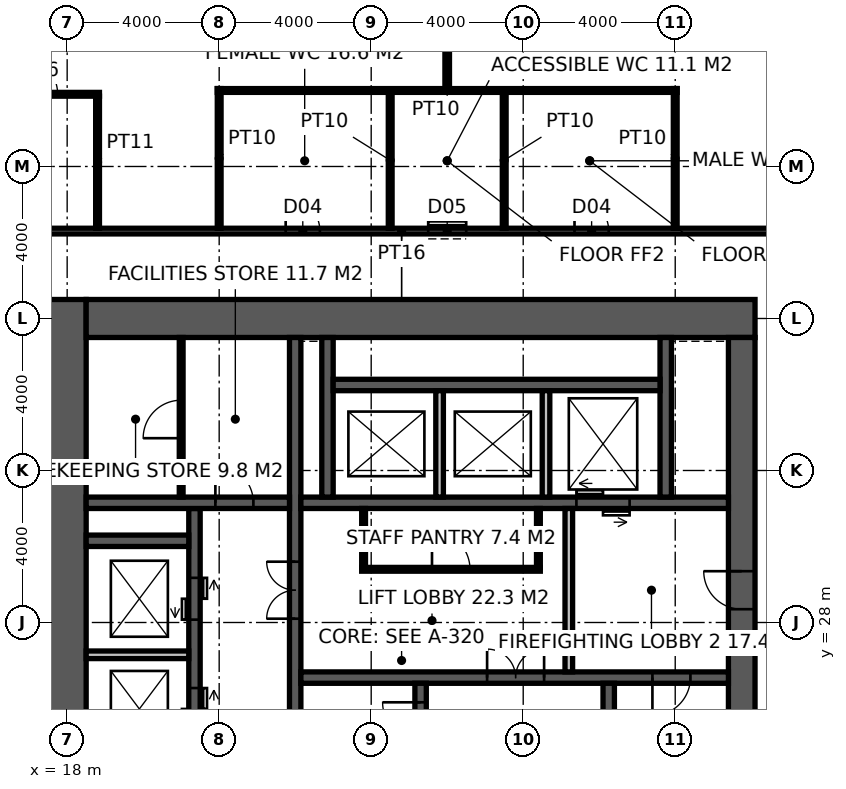
"""IFC4 building model, lengths in metres.
Left out: names, types, materials, properties, quantities, classifications, styles, units other than length and angle.
Written with IfcOpenShell. Run it as: python <this file> out.ifc"""

import sys

from ifc_helpers import new_model, si_unit, direction, frame, frame_2d, origin, place, context, subcontext, project, spatial, rectangle, extrude, element, fill, save


model = new_model("IFC4")
c1 = context("Model", 3, precision=1e-05, world=origin(), true_north=direction((0.0, 1.0)))
c2 = subcontext(c1, "Body", "Model", "MODEL_VIEW")
j1 = project(units=[si_unit("LENGTHUNIT", "METRE"), si_unit("PLANEANGLEUNIT", "RADIAN")], contexts=[c1])
p1 = place(None, origin())
s1 = spatial("IfcSite", under=j1, at=p1, CompositionType="ELEMENT")
p2 = place(p1, origin())
s2 = spatial("IfcBuilding", under=s1, at=p2, CompositionType="ELEMENT")
p3 = place(p2, frame((0.0, 0.0, 81.4)))
s3 = spatial("IfcBuildingStorey", under=s2, at=p3, CompositionType="ELEMENT", Elevation=81.4)
p4 = place(p3, frame((18.0, 17.5, -0.15), z_axis=(0.0, 0.0, 1.0), x_axis=(0.0, 1.0, 0.0)))
e1 = element("IfcWall", 1, at=p4, inside=s3, PredefinedType="SHEAR", context=c2, shape_type="SweptSolid", body=[
    extrude(rectangle(XDim=19.0, YDim=1.0, at=frame_2d((9.5, 0.0))), origin(), (0.0, 0.0, 1.0), 4.0),
])
p5 = place(p3, frame((18.5, 36.0, -0.15), z_axis=(0.0, 0.0, 1.0), x_axis=(1.0, 0.0, 0.0)))
e2 = element("IfcWall", 2, at=p5, inside=s3, PredefinedType="SHEAR", context=c2, shape_type="SweptSolid", body=[
    extrude(rectangle(XDim=17.6, YDim=1.0, at=frame_2d((8.8, 0.0))), origin(), (0.0, 0.0, 1.0), 4.0),
])
p6 = place(p3, frame((35.75, 18.5, -0.15), z_axis=(0.0, 0.0, 1.0), x_axis=(0.0, 1.0, 0.0)))
e3 = element("IfcWall", 3, at=p6, inside=s3, PredefinedType="SHEAR", context=c2, shape_type="SweptSolid", body=[
    extrude(rectangle(XDim=17.0, YDim=0.7, at=frame_2d((8.5, 0.0))), origin(), (0.0, 0.0, 1.0), 4.0),
])
p7 = place(p6, frame((9.85, 0.0, 0.15)))
e4 = element("IfcOpeningElement", 4, at=p7, cuts=e3, PredefinedType="OPENING", context=c2, shape_type="SweptSolid", body=[
    extrude(rectangle(XDim=1.0, YDim=2.2, at=frame_2d((0.5, 1.1))), frame((0.0, 0.36, 0.0), z_axis=(0.0, -1.0, 0.0), x_axis=(1.0, 0.0, 0.0)), (0.0, 0.0, 1.0), 0.72),
])
p8 = place(p3, frame((24.0, 18.5, -0.15), z_axis=(0.0, 0.0, 1.0), x_axis=(0.0, 1.0, 0.0)))
e5 = element("IfcWall", 5, at=p8, inside=s3, PredefinedType="SHEAR", context=c2, shape_type="SweptSolid", body=[
    extrude(rectangle(XDim=17.0, YDim=0.3, at=frame_2d((8.5, 0.0))), origin(), (0.0, 0.0, 1.0), 4.0),
])
p9 = place(p8, frame((9.6, 0.0, 0.15)))
e6 = element("IfcOpeningElement", 6, at=p9, cuts=e5, PredefinedType="OPENING", context=c2, shape_type="SweptSolid", body=[
    extrude(rectangle(XDim=1.5, YDim=2.4, at=frame_2d((0.75, 1.2))), frame((0.0, 0.16, 0.0), z_axis=(0.0, -1.0, 0.0), x_axis=(1.0, 0.0, 0.0)), (0.0, 0.0, 1.0), 0.32),
])
p10 = place(p3, frame((24.15, 26.55, -0.15), z_axis=(0.0, 0.0, 1.0), x_axis=(1.0, 0.0, 0.0)))
e7 = element("IfcWall", 7, at=p10, inside=s3, PredefinedType="SHEAR", context=c2, shape_type="SweptSolid", body=[
    extrude(rectangle(XDim=11.25, YDim=0.3, at=frame_2d((5.625, 0.0))), origin(), (0.0, 0.0, 1.0), 4.0),
])
p11 = place(p10, frame((9.25, 0.0, 0.15)))
e8 = element("IfcOpeningElement", 8, at=p11, cuts=e7, PredefinedType="OPENING", context=c2, shape_type="SweptSolid", body=[
    extrude(rectangle(XDim=1.0, YDim=2.2, at=frame_2d((0.5, 1.1))), frame((0.0, 0.16, 0.0), z_axis=(0.0, -1.0, 0.0), x_axis=(1.0, 0.0, 0.0)), (0.0, 0.0, 1.0), 0.32),
])
p12 = place(p10, frame((4.9, 0.0, 0.15)))
e9 = element("IfcOpeningElement", 9, at=p12, cuts=e7, PredefinedType="OPENING", context=c2, shape_type="SweptSolid", body=[
    extrude(rectangle(XDim=1.5, YDim=2.4, at=frame_2d((0.75, 1.2))), frame((0.0, 0.16, 0.0), z_axis=(0.0, -1.0, 0.0), x_axis=(1.0, 0.0, 0.0)), (0.0, 0.0, 1.0), 0.32),
])
p13 = place(p3, frame((27.3, 18.5, -0.15), z_axis=(0.0, 0.0, 1.0), x_axis=(0.0, 1.0, 0.0)))
e10 = element("IfcWall", 10, at=p13, inside=s3, PredefinedType="SHEAR", context=c2, shape_type="SweptSolid", body=[
    extrude(rectangle(XDim=7.9, YDim=0.3, at=frame_2d((3.95, 0.0))), origin(), (0.0, 0.0, 1.0), 4.0),
])
p14 = place(p13, frame((6.4, 0.0, 0.15)))
e11 = element("IfcOpeningElement", 11, at=p14, cuts=e10, PredefinedType="OPENING", context=c2, shape_type="SweptSolid", body=[
    extrude(rectangle(XDim=1.0, YDim=2.2, at=frame_2d((0.5, 1.1))), frame((0.0, 0.16, 0.0), z_axis=(0.0, -1.0, 0.0), x_axis=(1.0, 0.0, 0.0)), (0.0, 0.0, 1.0), 0.32),
])
p15 = place(p3, frame((32.25, 18.5, -0.15), z_axis=(0.0, 0.0, 1.0), x_axis=(0.0, 1.0, 0.0)))
e12 = element("IfcWall", 12, at=p15, inside=s3, PredefinedType="SHEAR", context=c2, shape_type="SweptSolid", body=[
    extrude(rectangle(XDim=7.9, YDim=0.3, at=frame_2d((3.95, 0.0))), origin(), (0.0, 0.0, 1.0), 4.0),
])
p16 = place(p3, frame((24.15, 31.15, -0.15), z_axis=(0.0, 0.0, 1.0), x_axis=(1.0, 0.0, 0.0)))
e13 = element("IfcWall", 13, at=p16, inside=s3, PredefinedType="SHEAR", context=c2, shape_type="SweptSolid", body=[
    extrude(rectangle(XDim=11.25, YDim=0.3, at=frame_2d((5.625, 0.0))), origin(), (0.0, 0.0, 1.0), 4.0),
])
p17 = place(p16, frame((7.25, 0.0, 0.15)))
e14 = element("IfcOpeningElement", 14, at=p17, cuts=e13, PredefinedType="OPENING", context=c2, shape_type="SweptSolid", body=[
    extrude(rectangle(XDim=1.4, YDim=2.4, at=frame_2d((0.7, 1.2))), frame((0.0, 0.16, 0.0), z_axis=(0.0, -1.0, 0.0), x_axis=(1.0, 0.0, 0.0)), (0.0, 0.0, 1.0), 0.32),
])
p18 = place(p3, frame((21.35, 18.5, -0.15), z_axis=(0.0, 0.0, 1.0), x_axis=(0.0, 1.0, 0.0)))
e15 = element("IfcWall", 15, at=p18, inside=s3, PredefinedType="SHEAR", context=c2, shape_type="SweptSolid", body=[
    extrude(rectangle(XDim=12.5, YDim=0.3, at=frame_2d((6.25, 0.0))), origin(), (0.0, 0.0, 1.0), 4.0),
])
p19 = place(p18, frame((0.875, 0.0, 0.15)))
e16 = element("IfcOpeningElement", 16, at=p19, cuts=e15, PredefinedType="OPENING", context=c2, shape_type="SweptSolid", body=[
    extrude(rectangle(XDim=1.1, YDim=2.2, at=frame_2d((0.55, 1.1))), frame((0.0, 0.16, 0.0), z_axis=(0.0, -1.0, 0.0), x_axis=(1.0, 0.0, 0.0)), (0.0, 0.0, 1.0), 0.32),
])
p20 = place(p18, frame((3.825, 0.0, 0.15)))
e17 = element("IfcOpeningElement", 17, at=p20, cuts=e15, PredefinedType="OPENING", context=c2, shape_type="SweptSolid", body=[
    extrude(rectangle(XDim=1.1, YDim=2.2, at=frame_2d((0.55, 1.1))), frame((0.0, 0.16, 0.0), z_axis=(0.0, -1.0, 0.0), x_axis=(1.0, 0.0, 0.0)), (0.0, 0.0, 1.0), 0.32),
])
p21 = place(p18, frame((6.675, 0.0, 0.15)))
e18 = element("IfcOpeningElement", 18, at=p21, cuts=e15, PredefinedType="OPENING", context=c2, shape_type="SweptSolid", body=[
    extrude(rectangle(XDim=1.1, YDim=2.2, at=frame_2d((0.55, 1.1))), frame((0.0, 0.16, 0.0), z_axis=(0.0, -1.0, 0.0), x_axis=(1.0, 0.0, 0.0)), (0.0, 0.0, 1.0), 0.32),
])
p22 = place(p18, frame((9.575, 0.0, 0.15)))
e19 = element("IfcOpeningElement", 19, at=p22, cuts=e15, PredefinedType="OPENING", context=c2, shape_type="SweptSolid", body=[
    extrude(rectangle(XDim=1.1, YDim=2.2, at=frame_2d((0.55, 1.1))), frame((0.0, 0.16, 0.0), z_axis=(0.0, -1.0, 0.0), x_axis=(1.0, 0.0, 0.0)), (0.0, 0.0, 1.0), 0.32),
])
p23 = place(p3, frame((18.5, 31.15, -0.15), z_axis=(0.0, 0.0, 1.0), x_axis=(1.0, 0.0, 0.0)))
e20 = element("IfcWall", 20, at=p23, inside=s3, PredefinedType="SHEAR", context=c2, shape_type="SweptSolid", body=[
    extrude(rectangle(XDim=5.35, YDim=0.3, at=frame_2d((2.675, 0.0))), origin(), (0.0, 0.0, 1.0), 4.0),
])
p24 = place(p23, frame((3.4, 0.0, 0.15)))
e21 = element("IfcOpeningElement", 21, at=p24, cuts=e20, PredefinedType="OPENING", context=c2, shape_type="SweptSolid", body=[
    extrude(rectangle(XDim=1.0, YDim=2.2, at=frame_2d((0.5, 1.1))), frame((0.0, 0.16, 0.0), z_axis=(0.0, -1.0, 0.0), x_axis=(1.0, 0.0, 0.0)), (0.0, 0.0, 1.0), 0.32),
])
p25 = place(p3, frame((18.5, 30.15, -0.15), z_axis=(0.0, 0.0, 1.0), x_axis=(1.0, 0.0, 0.0)))
e22 = element("IfcWall", 22, at=p25, inside=s3, PredefinedType="SHEAR", context=c2, shape_type="SweptSolid", body=[
    extrude(rectangle(XDim=2.7, YDim=0.3, at=frame_2d((1.35, 0.0))), origin(), (0.0, 0.0, 1.0), 4.0),
])
for number, where, z_axis, x_axis in (
    (23, (24.85, 31.3, -0.15), (0.0, 0.0, 1.0), (0.0, 1.0, 0.0)),
    (24, (33.75, 31.3, -0.15), (0.0, 0.0, 1.0), (0.0, 1.0, 0.0)),
):
    element("IfcWall", number, at=place(p3, frame(where, z_axis=z_axis, x_axis=x_axis)), inside=s3, PredefinedType="SHEAR", context=c2, shape_type="SweptSolid", body=[
        extrude(rectangle(XDim=4.2, YDim=0.3, at=frame_2d((2.1, 0.0))), origin(), (0.0, 0.0, 1.0), 4.0),
    ])
p26 = place(p3, frame((25.0, 34.25, -0.15), z_axis=(0.0, 0.0, 1.0), x_axis=(1.0, 0.0, 0.0)))
e25 = element("IfcWall", 25, at=p26, inside=s3, PredefinedType="SHEAR", context=c2, shape_type="SweptSolid", body=[
    extrude(rectangle(XDim=8.6, YDim=0.3, at=frame_2d((4.3, 0.0))), origin(), (0.0, 0.0, 1.0), 4.0),
])
for number, where, z_axis, x_axis in (
    (26, (27.8, 31.3, -0.15), (0.0, 0.0, 1.0), (0.0, 1.0, 0.0)),
    (27, (30.6, 31.3, -0.15), (0.0, 0.0, 1.0), (0.0, 1.0, 0.0)),
):
    element("IfcWall", number, at=place(p3, frame(where, z_axis=z_axis, x_axis=x_axis)), inside=s3, PredefinedType="SOLIDWALL", context=c2, shape_type="SweptSolid", body=[
        extrude(rectangle(XDim=2.8, YDim=0.2, at=frame_2d((1.4, 0.0))), origin(), (0.0, 0.0, 1.0), 4.0),
    ])
p27 = place(p3, frame((18.5, 27.15, -0.15), z_axis=(0.0, 0.0, 1.0), x_axis=(1.0, 0.0, 0.0)))
e28 = element("IfcWall", 28, at=p27, inside=s3, PredefinedType="SOLIDWALL", context=c2, shape_type="SweptSolid", body=[
    extrude(rectangle(XDim=2.7, YDim=0.2, at=frame_2d((1.35, 0.0))), origin(), (0.0, 0.0, 1.0), 4.0),
])
p28 = place(p3, frame((31.2, 26.7, 0.0), z_axis=(0.0, 0.0, 1.0), x_axis=(0.0, 1.0, 0.0)))
e29 = element("IfcWall", 29, at=p28, inside=s3, PredefinedType="SOLIDWALL", context=c2, shape_type="SweptSolid", body=[
    extrude(rectangle(XDim=4.3, YDim=0.2, at=frame_2d((2.15, 0.0))), origin(), (0.0, 0.0, 1.0), 3.85),
])
p29 = place(p3, frame((21.0, 31.3, 0.0), z_axis=(0.0, 0.0, 1.0), x_axis=(0.0, 1.0, 0.0)))
e30 = element("IfcWall", 30, at=p29, inside=s3, PredefinedType="PARTITIONING", context=c2, shape_type="SweptSolid", body=[
    extrude(rectangle(XDim=4.2, YDim=0.1, at=frame_2d((2.1, 0.0))), origin(), (0.0, 0.0, 1.0), 3.85),
])
p30 = place(p29, frame((1.55, 0.0, 0.0)))
e31 = element("IfcOpeningElement", 31, at=p30, cuts=e30, PredefinedType="OPENING", context=c2, shape_type="SweptSolid", body=[
    extrude(rectangle(XDim=1.0, YDim=2.2, at=frame_2d((0.5, 1.1))), frame((0.0, 0.06, 0.0), z_axis=(0.0, -1.0, 0.0), x_axis=(1.0, 0.0, 0.0)), (0.0, 0.0, 1.0), 0.12),
])
p31 = place(p3, frame((25.75, 29.4, 0.0), z_axis=(0.0, 0.0, 1.0), x_axis=(1.0, 0.0, 0.0)))
e32 = element("IfcWall", 32, at=p31, inside=s3, PredefinedType="PARTITIONING", context=c2, shape_type="SweptSolid", body=[
    extrude(rectangle(XDim=4.7, YDim=0.1, at=frame_2d((2.35, 0.0))), origin(), (0.0, 0.0, 1.0), 3.85),
])
p32 = place(p31, frame((1.85, 0.0, 0.0)))
e33 = element("IfcOpeningElement", 33, at=p32, cuts=e32, PredefinedType="OPENING", context=c2, shape_type="SweptSolid", body=[
    extrude(rectangle(XDim=1.0, YDim=2.2, at=frame_2d((0.5, 1.1))), frame((0.0, 0.06, 0.0), z_axis=(0.0, -1.0, 0.0), x_axis=(1.0, 0.0, 0.0)), (0.0, 0.0, 1.0), 0.12),
])
for number, where, z_axis, x_axis in (
    (34, (25.8, 29.45, 0.0), (0.0, 0.0, 1.0), (0.0, 1.0, 0.0)),
    (35, (30.4, 29.45, 0.0), (0.0, 0.0, 1.0), (0.0, 1.0, 0.0)),
):
    element("IfcWall", number, at=place(p3, frame(where, z_axis=z_axis, x_axis=x_axis)), inside=s3, PredefinedType="PARTITIONING", context=c2, shape_type="SweptSolid", body=[
        extrude(rectangle(XDim=1.55, YDim=0.1, at=frame_2d((0.775, 0.0))), origin(), (0.0, 0.0, 1.0), 3.85),
    ])
p33 = place(p3, frame((15.775, 38.3, 0.0), z_axis=(0.0, 0.0, 1.0), x_axis=(1.0, 0.0, 0.0)))
e36 = element("IfcWall", 36, at=p33, inside=s3, PredefinedType="PARTITIONING", context=c2, shape_type="SweptSolid", body=[
    extrude(rectangle(XDim=22.05, YDim=0.15, at=frame_2d((11.025, 0.0))), origin(), (0.0, 0.0, 1.0), 3.85),
])
p34 = place(p33, frame((7.975, 0.0, 0.0)))
e37 = element("IfcOpeningElement", 37, at=p34, cuts=e36, PredefinedType="OPENING", context=c2, shape_type="SweptSolid", body=[
    extrude(rectangle(XDim=0.9, YDim=2.1, at=frame_2d((0.45, 1.05))), frame((0.0, 0.085, 0.0), z_axis=(0.0, -1.0, 0.0), x_axis=(1.0, 0.0, 0.0)), (0.0, 0.0, 1.0), 0.17),
])
p35 = place(p33, frame((11.725, 0.0, 0.0)))
e38 = element("IfcOpeningElement", 38, at=p35, cuts=e36, PredefinedType="OPENING", context=c2, shape_type="SweptSolid", body=[
    extrude(rectangle(XDim=1.0, YDim=2.1, at=frame_2d((0.5, 1.05))), frame((0.0, 0.085, 0.0), z_axis=(0.0, -1.0, 0.0), x_axis=(1.0, 0.0, 0.0)), (0.0, 0.0, 1.0), 0.17),
])
p36 = place(p33, frame((15.575, 0.0, 0.0)))
e39 = element("IfcOpeningElement", 39, at=p36, cuts=e36, PredefinedType="OPENING", context=c2, shape_type="SweptSolid", body=[
    extrude(rectangle(XDim=0.9, YDim=2.1, at=frame_2d((0.45, 1.05))), frame((0.0, 0.085, 0.0), z_axis=(0.0, -1.0, 0.0), x_axis=(1.0, 0.0, 0.0)), (0.0, 0.0, 1.0), 0.17),
])
for number, where, z_axis, x_axis in (
    (40, (22.0, 38.375, 0.0), (0.0, 0.0, 1.0), (0.0, 1.0, 0.0)),
    (41, (34.0, 38.375, 0.0), (0.0, 0.0, 1.0), (0.0, 1.0, 0.0)),
):
    element("IfcWall", number, at=place(p3, frame(where, z_axis=z_axis, x_axis=x_axis)), inside=s3, PredefinedType="PARTITIONING", context=c2, shape_type="SweptSolid", body=[
        extrude(rectangle(XDim=3.675, YDim=0.1, at=frame_2d((1.837, 0.0))), origin(), (0.0, 0.0, 1.0), 2.95),
    ])
p37 = place(p3, frame((21.95, 42.0, 0.0), z_axis=(0.0, 0.0, 1.0), x_axis=(1.0, 0.0, 0.0)))
e42 = element("IfcWall", 42, at=p37, inside=s3, PredefinedType="PARTITIONING", context=c2, shape_type="SweptSolid", body=[
    extrude(rectangle(XDim=12.1, YDim=0.1, at=frame_2d((6.05, 0.0))), origin(), (0.0, 0.0, 1.0), 3.85),
])
for number, where, z_axis, x_axis in (
    (43, (26.5, 38.375, 0.0), (0.0, 0.0, 1.0), (0.0, 1.0, 0.0)),
    (44, (29.5, 38.375, 0.0), (0.0, 0.0, 1.0), (0.0, 1.0, 0.0)),
):
    element("IfcWall", number, at=place(p3, frame(where, z_axis=z_axis, x_axis=x_axis)), inside=s3, PredefinedType="PARTITIONING", context=c2, shape_type="SweptSolid", body=[
        extrude(rectangle(XDim=3.575, YDim=0.1, at=frame_2d((1.788, 0.0))), origin(), (0.0, 0.0, 1.0), 3.85),
    ])
p38 = place(p3, frame((28.0, 42.05, 0.0), z_axis=(0.0, 0.0, 1.0), x_axis=(0.0, 1.0, 0.0)))
e45 = element("IfcWall", 45, at=p38, inside=s3, PredefinedType="PARTITIONING", context=c2, shape_type="SweptSolid", body=[
    extrude(rectangle(XDim=5.65, YDim=0.12, at=frame_2d((2.825, 0.0))), origin(), (0.0, 0.0, 1.0), 3.85),
])
p39 = place(p3, frame((15.65, 41.9, 0.0), z_axis=(0.0, 0.0, 1.0), x_axis=(1.0, 0.0, 0.0)))
e46 = element("IfcWall", 46, at=p39, inside=s3, PredefinedType="PARTITIONING", context=c2, shape_type="SweptSolid", body=[
    extrude(rectangle(XDim=3.2, YDim=0.1, at=frame_2d((1.6, 0.0))), origin(), (0.0, 0.0, 1.0), 3.85),
])
p40 = place(p39, frame((1.1, 0.0, 0.0)))
e47 = element("IfcOpeningElement", 47, at=p40, cuts=e46, PredefinedType="OPENING", context=c2, shape_type="SweptSolid", body=[
    extrude(rectangle(XDim=1.0, YDim=2.2, at=frame_2d((0.5, 1.1))), frame((0.0, 0.06, 0.0), z_axis=(0.0, -1.0, 0.0), x_axis=(1.0, 0.0, 0.0)), (0.0, 0.0, 1.0), 0.12),
])
p41 = place(p3, frame((18.8, 38.375, 0.0), z_axis=(0.0, 0.0, 1.0), x_axis=(0.0, 1.0, 0.0)))
e48 = element("IfcWall", 48, at=p41, inside=s3, PredefinedType="PARTITIONING", context=c2, shape_type="SweptSolid", body=[
    extrude(rectangle(XDim=3.475, YDim=0.1, at=frame_2d((1.738, 0.0))), origin(), (0.0, 0.0, 1.0), 3.85),
])
p42 = place(p14, origin())
e49 = element("IfcDoor", 49, at=p42, inside=s3, OperationType="SINGLE_SWING_RIGHT", PredefinedType="DOOR", context=c2, shape_type="SweptSolid", body=[
    extrude(rectangle(XDim=1.0, YDim=2.2, at=frame_2d((0.5, 1.1))), frame((0.0, 0.025, 0.0), z_axis=(0.0, -1.0, 0.0), x_axis=(1.0, 0.0, 0.0)), (0.0, 0.0, 1.0), 0.05),
])
fill(e11, e49)
p43 = place(p11, frame((1.0, 0.0, 0.0), z_axis=(0.0, 0.0, 1.0), x_axis=(-1.0, 0.0, 0.0)))
e50 = element("IfcDoor", 50, at=p43, inside=s3, OperationType="SINGLE_SWING_RIGHT", PredefinedType="DOOR", context=c2, shape_type="SweptSolid", body=[
    extrude(rectangle(XDim=1.0, YDim=2.2, at=frame_2d((0.5, 1.1))), frame((0.0, 0.025, 0.0), z_axis=(0.0, -1.0, 0.0), x_axis=(1.0, 0.0, 0.0)), (0.0, 0.0, 1.0), 0.05),
])
fill(e8, e50)
p44 = place(p7, origin())
e51 = element("IfcDoor", 51, at=p44, inside=s3, OperationType="SINGLE_SWING_RIGHT", PredefinedType="DOOR", context=c2, shape_type="SweptSolid", body=[
    extrude(rectangle(XDim=1.0, YDim=2.2, at=frame_2d((0.5, 1.1))), frame((0.0, 0.025, 0.0), z_axis=(0.0, -1.0, 0.0), x_axis=(1.0, 0.0, 0.0)), (0.0, 0.0, 1.0), 0.05),
])
fill(e4, e51)
p45 = place(p12, origin())
e52 = element("IfcDoor", 52, at=p45, inside=s3, OperationType="DOUBLE_DOOR_DOUBLE_SWING", PredefinedType="DOOR", context=c2, shape_type="SweptSolid", body=[
    extrude(rectangle(XDim=1.5, YDim=2.4, at=frame_2d((0.75, 1.2))), frame((0.0, 0.025, 0.0), z_axis=(0.0, -1.0, 0.0), x_axis=(1.0, 0.0, 0.0)), (0.0, 0.0, 1.0), 0.05),
])
fill(e9, e52)
p46 = place(p9, origin())
e53 = element("IfcDoor", 53, at=p46, inside=s3, OperationType="DOUBLE_DOOR_DOUBLE_SWING", PredefinedType="DOOR", context=c2, shape_type="SweptSolid", body=[
    extrude(rectangle(XDim=1.5, YDim=2.4, at=frame_2d((0.75, 1.2))), frame((0.0, 0.025, 0.0), z_axis=(0.0, -1.0, 0.0), x_axis=(1.0, 0.0, 0.0)), (0.0, 0.0, 1.0), 0.05),
])
fill(e6, e53)
p47 = place(p24, origin())
e54 = element("IfcDoor", 54, at=p47, inside=s3, OperationType="SINGLE_SWING_LEFT", PredefinedType="DOOR", context=c2, shape_type="SweptSolid", body=[
    extrude(rectangle(XDim=1.0, YDim=2.2, at=frame_2d((0.5, 1.1))), frame((0.0, 0.025, 0.0), z_axis=(0.0, -1.0, 0.0), x_axis=(1.0, 0.0, 0.0)), (0.0, 0.0, 1.0), 0.05),
])
fill(e21, e54)
p48 = place(p30, origin())
e55 = element("IfcDoor", 55, at=p48, inside=s3, OperationType="SINGLE_SWING_LEFT", PredefinedType="DOOR", context=c2, shape_type="SweptSolid", body=[
    extrude(rectangle(XDim=1.0, YDim=2.2, at=frame_2d((0.5, 1.1))), frame((0.0, 0.025, 0.0), z_axis=(0.0, -1.0, 0.0), x_axis=(1.0, 0.0, 0.0)), (0.0, 0.0, 1.0), 0.05),
])
fill(e31, e55)
p49 = place(p32, origin())
e56 = element("IfcDoor", 56, at=p49, inside=s3, OperationType="SINGLE_SWING_LEFT", PredefinedType="DOOR", context=c2, shape_type="SweptSolid", body=[
    extrude(rectangle(XDim=1.0, YDim=2.2, at=frame_2d((0.5, 1.1))), frame((0.0, 0.025, 0.0), z_axis=(0.0, -1.0, 0.0), x_axis=(1.0, 0.0, 0.0)), (0.0, 0.0, 1.0), 0.05),
])
fill(e33, e56)
p50 = place(p34, origin())
e57 = element("IfcDoor", 57, at=p50, inside=s3, OperationType="SINGLE_SWING_LEFT", PredefinedType="DOOR", context=c2, shape_type="SweptSolid", body=[
    extrude(rectangle(XDim=0.9, YDim=2.1, at=frame_2d((0.45, 1.05))), frame((0.0, 0.025, 0.0), z_axis=(0.0, -1.0, 0.0), x_axis=(1.0, 0.0, 0.0)), (0.0, 0.0, 1.0), 0.05),
])
fill(e37, e57)
p51 = place(p35, origin())
e58 = element("IfcDoor", 58, at=p51, inside=s3, OperationType="SLIDING_TO_LEFT", PredefinedType="DOOR", context=c2, shape_type="SweptSolid", body=[
    extrude(rectangle(XDim=1.0, YDim=2.1, at=frame_2d((0.5, 1.05))), frame((0.0, 0.025, 0.0), z_axis=(0.0, -1.0, 0.0), x_axis=(1.0, 0.0, 0.0)), (0.0, 0.0, 1.0), 0.05),
])
fill(e38, e58)
p52 = place(p36, origin())
e59 = element("IfcDoor", 59, at=p52, inside=s3, OperationType="SINGLE_SWING_LEFT", PredefinedType="DOOR", context=c2, shape_type="SweptSolid", body=[
    extrude(rectangle(XDim=0.9, YDim=2.1, at=frame_2d((0.45, 1.05))), frame((0.0, 0.025, 0.0), z_axis=(0.0, -1.0, 0.0), x_axis=(1.0, 0.0, 0.0)), (0.0, 0.0, 1.0), 0.05),
])
fill(e39, e59)
p53 = place(p40, origin())
e60 = element("IfcDoor", 60, at=p53, inside=s3, OperationType="SINGLE_SWING_LEFT", PredefinedType="DOOR", context=c2, shape_type="SweptSolid", body=[
    extrude(rectangle(XDim=1.0, YDim=2.2, at=frame_2d((0.5, 1.1))), frame((0.0, 0.025, 0.0), z_axis=(0.0, -1.0, 0.0), x_axis=(1.0, 0.0, 0.0)), (0.0, 0.0, 1.0), 0.05),
])
fill(e47, e60)
p54 = place(p17, origin())
e61 = element("IfcDoor", 61, at=p54, inside=s3, OperationType="DOUBLE_DOOR_SLIDING", PredefinedType="DOOR", context=c2, shape_type="SweptSolid", body=[
    extrude(rectangle(XDim=1.4, YDim=2.4, at=frame_2d((0.7, 1.2))), frame((0.0, 0.025, 0.0), z_axis=(0.0, -1.0, 0.0), x_axis=(1.0, 0.0, 0.0)), (0.0, 0.0, 1.0), 0.05),
])
fill(e14, e61)
p55 = place(p21, origin())
e62 = element("IfcDoor", 62, at=p55, inside=s3, OperationType="DOUBLE_DOOR_SLIDING", PredefinedType="DOOR", context=c2, shape_type="SweptSolid", body=[
    extrude(rectangle(XDim=1.1, YDim=2.2, at=frame_2d((0.55, 1.1))), frame((0.0, 0.025, 0.0), z_axis=(0.0, -1.0, 0.0), x_axis=(1.0, 0.0, 0.0)), (0.0, 0.0, 1.0), 0.05),
])
fill(e18, e62)
p56 = place(p22, origin())
e63 = element("IfcDoor", 63, at=p56, inside=s3, OperationType="DOUBLE_DOOR_SLIDING", PredefinedType="DOOR", context=c2, shape_type="SweptSolid", body=[
    extrude(rectangle(XDim=1.1, YDim=2.2, at=frame_2d((0.55, 1.1))), frame((0.0, 0.025, 0.0), z_axis=(0.0, -1.0, 0.0), x_axis=(1.0, 0.0, 0.0)), (0.0, 0.0, 1.0), 0.05),
])
fill(e19, e63)
save(model, sys.argv[1])
